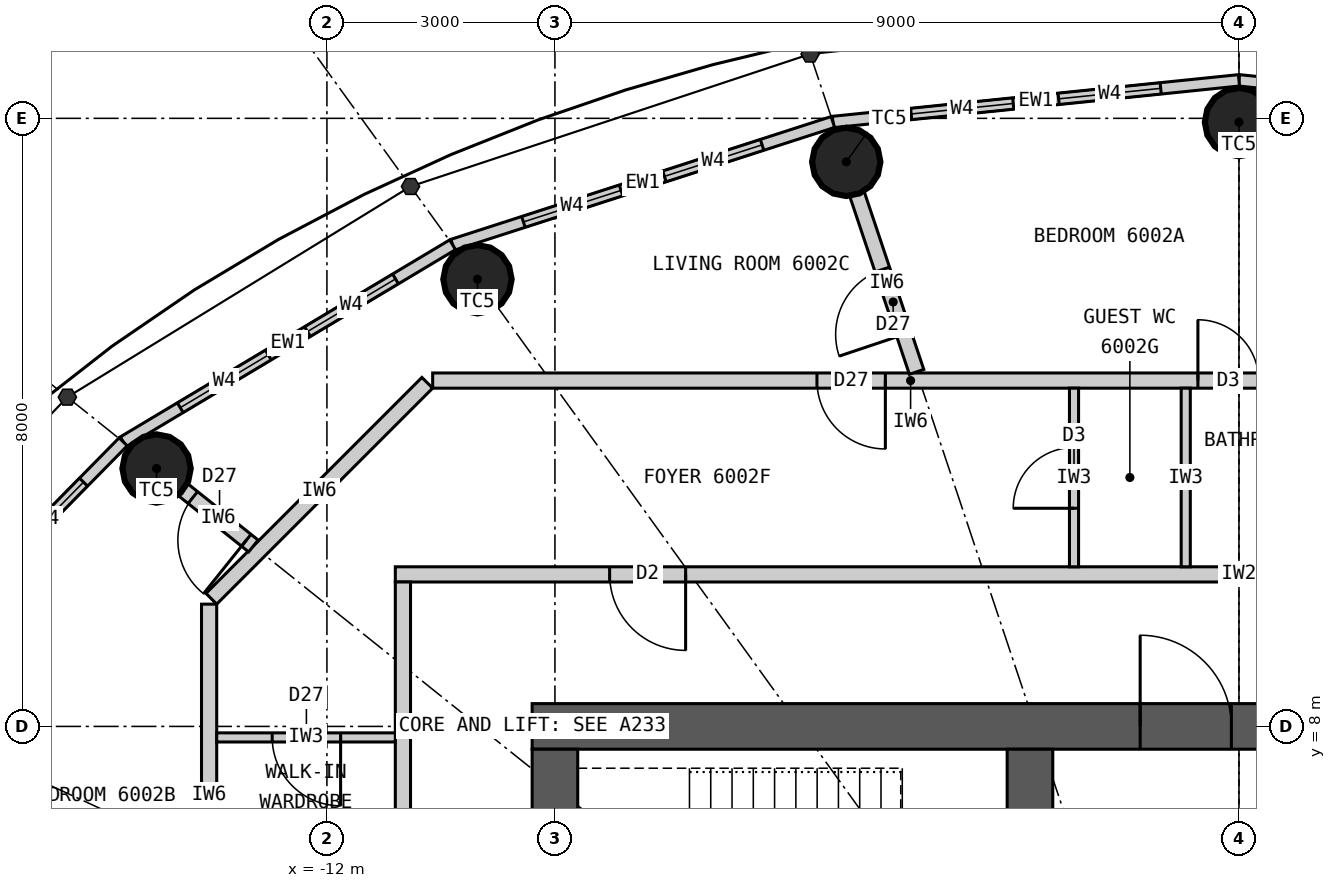
"""IFC4 building model, lengths in metres.
Left out: names, types, materials, properties, quantities, classifications, styles, units other than length and angle.
Written with IfcOpenShell. Run it as: python <this file> out.ifc"""

import sys

from ifc_helpers import new_model, si_unit, direction, frame, frame_2d, origin, origin_2d, place, context, subcontext, project, spatial, rectangle, circle, extrude, element, fill, save


model = new_model("IFC4")
c1 = context("Model", 3, precision=1e-05, world=origin(), true_north=direction((0.0, 1.0)))
c2 = subcontext(c1, "Body", "Model", "MODEL_VIEW")
j1 = project(units=[si_unit("LENGTHUNIT", "METRE"), si_unit("PLANEANGLEUNIT", "RADIAN")], contexts=[c1])
p1 = place(None, origin())
s1 = spatial("IfcSite", under=j1, at=p1, CompositionType="ELEMENT")
p2 = place(p1, origin())
s2 = spatial("IfcBuilding", under=s1, at=p2, CompositionType="ELEMENT")
p3 = place(p2, frame((0.0, 0.0, 222.6)))
s3 = spatial("IfcBuildingStorey", under=s2, at=p3, CompositionType="ELEMENT", Elevation=222.6)
for number, where, z_axis, x_axis in (
    (1, (0.0, 15.95, 0.0), (0.0, 0.0, 1.0), (1.0, 0.0, 0.0)),
    (2, (-5.167, 15.427, 0.0), (0.0, 0.0, 1.0), (1.0, 0.0, 0.0)),
    (3, (-10.019, 13.883, 0.0), (0.0, 0.0, 1.0), (1.0, 0.0, 0.0)),
    (4, (-14.241, 11.393, 0.0), (0.0, 0.0, 1.0), (1.0, 0.0, 0.0)),
):
    element("IfcColumn", number, at=place(p3, frame(where, z_axis=z_axis, x_axis=x_axis)), inside=s3, PredefinedType="COLUMN", context=c2, shape_type="SweptSolid", body=[
        extrude(circle(Radius=0.45, at=origin_2d()), origin(), (0.0, 0.0, 1.0), 3.3),
    ])
p4 = place(p3, frame((-9.3, 8.0, 0.0), z_axis=(0.0, 0.0, 1.0), x_axis=(1.0, 0.0, 0.0)))
e5 = element("IfcWall", 5, at=p4, inside=s3, PredefinedType="SHEAR", context=c2, shape_type="SweptSolid", body=[
    extrude(rectangle(XDim=18.6, YDim=0.6, at=frame_2d((9.3, 0.0))), origin(), (0.0, 0.0, 1.0), 3.3),
])
p5 = place(p4, frame((8.0, 0.0, 0.0)))
e6 = element("IfcOpeningElement", 6, at=p5, cuts=e5, PredefinedType="OPENING", context=c2, shape_type="SweptSolid", body=[
    extrude(rectangle(XDim=1.2, YDim=2.2, at=frame_2d((0.6, 1.1))), frame((0.0, 0.31, 0.0), z_axis=(0.0, -1.0, 0.0), x_axis=(1.0, 0.0, 0.0)), (0.0, 0.0, 1.0), 0.62),
])
p6 = place(p4, frame((15.6, 0.0, 0.0)))
e7 = element("IfcOpeningElement", 7, at=p6, cuts=e5, PredefinedType="OPENING", context=c2, shape_type="SweptSolid", body=[
    extrude(rectangle(XDim=0.9, YDim=2.2, at=frame_2d((0.45, 1.1))), frame((0.0, 0.31, 0.0), z_axis=(0.0, -1.0, 0.0), x_axis=(1.0, 0.0, 0.0)), (0.0, 0.0, 1.0), 0.62),
])
p7 = place(p3, frame((-9.0, 7.7, 0.0), z_axis=(0.0, 0.0, 1.0), x_axis=(0.0, -1.0, 0.0)))
e8 = element("IfcWall", 8, at=p7, inside=s3, PredefinedType="SHEAR", context=c2, shape_type="SweptSolid", body=[
    extrude(rectangle(XDim=15.4, YDim=0.6, at=frame_2d((7.7, 0.0))), origin(), (0.0, 0.0, 1.0), 3.3),
])
p8 = place(p7, frame((6.8, 0.0, 0.0)))
e9 = element("IfcOpeningElement", 9, at=p8, cuts=e8, PredefinedType="OPENING", context=c2, shape_type="SweptSolid", body=[
    extrude(rectangle(XDim=1.8, YDim=2.2, at=frame_2d((0.9, 1.1))), frame((0.0, 0.31, 0.0), z_axis=(0.0, -1.0, 0.0), x_axis=(1.0, 0.0, 0.0)), (0.0, 0.0, 1.0), 0.62),
])
p9 = place(p3, frame((-2.75, 4.5, 0.0), z_axis=(0.0, 0.0, 1.0), x_axis=(0.0, 1.0, 0.0)))
e10 = element("IfcWall", 10, at=p9, inside=s3, PredefinedType="SHEAR", context=c2, shape_type="SweptSolid", body=[
    extrude(rectangle(XDim=3.2, YDim=0.6, at=frame_2d((1.6, 0.0))), origin(), (0.0, 0.0, 1.0), 3.3),
])
p10 = place(p9, frame((0.925, 0.0, 0.0)))
e11 = element("IfcOpeningElement", 11, at=p10, cuts=e10, PredefinedType="OPENING", context=c2, shape_type="SweptSolid", body=[
    extrude(rectangle(XDim=1.1, YDim=2.2, at=frame_2d((0.55, 1.1))), frame((0.0, 0.31, 0.0), z_axis=(0.0, -1.0, 0.0), x_axis=(1.0, 0.0, 0.0)), (0.0, 0.0, 1.0), 0.62),
])
p11 = place(p3, frame((5.343, 15.952, 0.0), z_axis=(0.0, 0.0, 1.0), x_axis=(-0.994774574972, 0.102095763818, 0.0)))
e12 = element("IfcWall", 12, at=p11, inside=s3, PredefinedType="ELEMENTEDWALL", context=c2, shape_type="SweptSolid", body=[
    extrude(rectangle(XDim=5.371, YDim=0.15, at=frame_2d((2.686, 0.0))), origin(), (0.0, 0.0, 1.0), 3.12),
])
p12 = place(p11, frame((1.035, 0.0, 0.9)))
e13 = element("IfcOpeningElement", 13, at=p12, cuts=e12, PredefinedType="OPENING", context=c2, shape_type="SweptSolid", body=[
    extrude(rectangle(XDim=1.35, YDim=1.9, at=frame_2d((0.675, 0.95))), frame((0.0, 0.085, 0.0), z_axis=(0.0, -1.0, 0.0), x_axis=(1.0, 0.0, 0.0)), (0.0, 0.0, 1.0), 0.17),
])
p13 = place(p11, frame((2.985, 0.0, 0.9)))
e14 = element("IfcOpeningElement", 14, at=p13, cuts=e12, PredefinedType="OPENING", context=c2, shape_type="SweptSolid", body=[
    extrude(rectangle(XDim=1.35, YDim=1.9, at=frame_2d((0.675, 0.95))), frame((0.0, 0.085, 0.0), z_axis=(0.0, -1.0, 0.0), x_axis=(1.0, 0.0, 0.0)), (0.0, 0.0, 1.0), 0.17),
])
p14 = place(p3, frame((0.0, 16.5, 0.0), z_axis=(0.0, 0.0, 1.0), x_axis=(-0.994774574972, -0.102095763818, 0.0)))
e15 = element("IfcWall", 15, at=p14, inside=s3, PredefinedType="ELEMENTEDWALL", context=c2, shape_type="SweptSolid", body=[
    extrude(rectangle(XDim=5.371, YDim=0.15, at=frame_2d((2.686, 0.0))), origin(), (0.0, 0.0, 1.0), 3.12),
])
p15 = place(p14, frame((1.035, 0.0, 0.9)))
e16 = element("IfcOpeningElement", 16, at=p15, cuts=e15, PredefinedType="OPENING", context=c2, shape_type="SweptSolid", body=[
    extrude(rectangle(XDim=1.35, YDim=1.9, at=frame_2d((0.675, 0.95))), frame((0.0, 0.085, 0.0), z_axis=(0.0, -1.0, 0.0), x_axis=(1.0, 0.0, 0.0)), (0.0, 0.0, 1.0), 0.17),
])
p16 = place(p14, frame((2.985, 0.0, 0.9)))
e17 = element("IfcOpeningElement", 17, at=p16, cuts=e15, PredefinedType="OPENING", context=c2, shape_type="SweptSolid", body=[
    extrude(rectangle(XDim=1.35, YDim=1.9, at=frame_2d((0.675, 0.95))), frame((0.0, 0.085, 0.0), z_axis=(0.0, -1.0, 0.0), x_axis=(1.0, 0.0, 0.0)), (0.0, 0.0, 1.0), 0.17),
])
p17 = place(p3, frame((-5.343, 15.952, 0.0), z_axis=(0.0, 0.0, 1.0), x_axis=(-0.951644702515, -0.307200846638, 0.0)))
e18 = element("IfcWall", 18, at=p17, inside=s3, PredefinedType="ELEMENTEDWALL", context=c2, shape_type="SweptSolid", body=[
    extrude(rectangle(XDim=5.258, YDim=0.15, at=frame_2d((2.629, 0.0))), origin(), (0.0, 0.0, 1.0), 3.12),
])
p18 = place(p17, frame((0.979, 0.0, 0.9)))
e19 = element("IfcOpeningElement", 19, at=p18, cuts=e18, PredefinedType="OPENING", context=c2, shape_type="SweptSolid", body=[
    extrude(rectangle(XDim=1.35, YDim=1.9, at=frame_2d((0.675, 0.95))), frame((0.0, 0.085, 0.0), z_axis=(0.0, -1.0, 0.0), x_axis=(1.0, 0.0, 0.0)), (0.0, 0.0, 1.0), 0.17),
])
p19 = place(p17, frame((2.929, 0.0, 0.9)))
e20 = element("IfcOpeningElement", 20, at=p19, cuts=e18, PredefinedType="OPENING", context=c2, shape_type="SweptSolid", body=[
    extrude(rectangle(XDim=1.35, YDim=1.9, at=frame_2d((0.675, 0.95))), frame((0.0, 0.085, 0.0), z_axis=(0.0, -1.0, 0.0), x_axis=(1.0, 0.0, 0.0)), (0.0, 0.0, 1.0), 0.17),
])
p20 = place(p3, frame((-10.346, 14.336, 0.0), z_axis=(0.0, 0.0, 1.0), x_axis=(-0.85822150553, -0.513279502265, 0.0)))
e21 = element("IfcWall", 21, at=p20, inside=s3, PredefinedType="ELEMENTEDWALL", context=c2, shape_type="SweptSolid", body=[
    extrude(rectangle(XDim=5.05, YDim=0.15, at=frame_2d((2.525, 0.0))), origin(), (0.0, 0.0, 1.0), 3.12),
])
p21 = place(p20, frame((0.875, 0.0, 0.9)))
e22 = element("IfcOpeningElement", 22, at=p21, cuts=e21, PredefinedType="OPENING", context=c2, shape_type="SweptSolid", body=[
    extrude(rectangle(XDim=1.35, YDim=1.9, at=frame_2d((0.675, 0.95))), frame((0.0, 0.085, 0.0), z_axis=(0.0, -1.0, 0.0), x_axis=(1.0, 0.0, 0.0)), (0.0, 0.0, 1.0), 0.17),
])
p22 = place(p20, frame((2.825, 0.0, 0.9)))
e23 = element("IfcOpeningElement", 23, at=p22, cuts=e21, PredefinedType="OPENING", context=c2, shape_type="SweptSolid", body=[
    extrude(rectangle(XDim=1.35, YDim=1.9, at=frame_2d((0.675, 0.95))), frame((0.0, 0.085, 0.0), z_axis=(0.0, -1.0, 0.0), x_axis=(1.0, 0.0, 0.0)), (0.0, 0.0, 1.0), 0.17),
])
p23 = place(p3, frame((-14.68, 11.744, 0.0), z_axis=(0.0, 0.0, 1.0), x_axis=(-0.701527379618, -0.712642501993, 0.0)))
e24 = element("IfcWall", 24, at=p23, inside=s3, PredefinedType="ELEMENTEDWALL", context=c2, shape_type="SweptSolid", body=[
    extrude(rectangle(XDim=4.788, YDim=0.15, at=frame_2d((2.394, 0.0))), origin(), (0.0, 0.0, 1.0), 3.12),
])
p24 = place(p23, frame((0.744, 0.0, 0.9)))
e25 = element("IfcOpeningElement", 25, at=p24, cuts=e24, PredefinedType="OPENING", context=c2, shape_type="SweptSolid", body=[
    extrude(rectangle(XDim=1.35, YDim=1.9, at=frame_2d((0.675, 0.95))), frame((0.0, 0.085, 0.0), z_axis=(0.0, -1.0, 0.0), x_axis=(1.0, 0.0, 0.0)), (0.0, 0.0, 1.0), 0.17),
])
p25 = place(p23, frame((2.694, 0.0, 0.9)))
e26 = element("IfcOpeningElement", 26, at=p25, cuts=e24, PredefinedType="OPENING", context=c2, shape_type="SweptSolid", body=[
    extrude(rectangle(XDim=1.35, YDim=1.9, at=frame_2d((0.675, 0.95))), frame((0.0, 0.085, 0.0), z_axis=(0.0, -1.0, 0.0), x_axis=(1.0, 0.0, 0.0)), (0.0, 0.0, 1.0), 0.17),
])
p26 = place(p3, frame((-11.1, 10.0, 0.0), z_axis=(0.0, 0.0, 1.0), x_axis=(1.0, 0.0, 0.0)))
e27 = element("IfcWall", 27, at=p26, inside=s3, PredefinedType="PARTITIONING", context=c2, shape_type="SweptSolid", body=[
    extrude(rectangle(XDim=22.2, YDim=0.2, at=frame_2d((11.1, 0.0))), origin(), (0.0, 0.0, 1.0), 3.12),
])
p27 = place(p26, frame((20.9, 0.0, 0.0)))
e28 = element("IfcOpeningElement", 28, at=p27, cuts=e27, PredefinedType="OPENING", context=c2, shape_type="SweptSolid", body=[
    extrude(rectangle(XDim=1.0, YDim=2.2, at=frame_2d((0.5, 1.1))), frame((0.0, 0.11, 0.0), z_axis=(0.0, -1.0, 0.0), x_axis=(1.0, 0.0, 0.0)), (0.0, 0.0, 1.0), 0.22),
])
p28 = place(p26, frame((2.82, 0.0, 0.0)))
e29 = element("IfcOpeningElement", 29, at=p28, cuts=e27, PredefinedType="OPENING", context=c2, shape_type="SweptSolid", body=[
    extrude(rectangle(XDim=1.0, YDim=2.2, at=frame_2d((0.5, 1.1))), frame((0.0, 0.11, 0.0), z_axis=(0.0, -1.0, 0.0), x_axis=(1.0, 0.0, 0.0)), (0.0, 0.0, 1.0), 0.22),
])
p29 = place(p3, frame((-11.0, 9.9, 0.0), z_axis=(0.0, 0.0, 1.0), x_axis=(0.0, -1.0, 0.0)))
e30 = element("IfcWall", 30, at=p29, inside=s3, PredefinedType="PARTITIONING", context=c2, shape_type="SweptSolid", body=[
    extrude(rectangle(XDim=10.114, YDim=0.2, at=frame_2d((5.057, 0.0))), origin(), (0.0, 0.0, 1.0), 3.12),
])
p30 = place(p3, frame((1.968, 12.55, 0.0), z_axis=(0.0, 0.0, 1.0), x_axis=(-1.0, 0.0, 0.0)))
e31 = element("IfcWall", 31, at=p30, inside=s3, PredefinedType="PARTITIONING", context=c2, shape_type="SweptSolid", body=[
    extrude(rectangle(XDim=12.576, YDim=0.2, at=frame_2d((6.288, 0.0))), origin(), (0.0, 0.0, 1.0), 3.12),
])
p31 = place(p30, frame((1.708, 0.0, 0.0)))
e32 = element("IfcOpeningElement", 32, at=p31, cuts=e31, PredefinedType="OPENING", context=c2, shape_type="SweptSolid", body=[
    extrude(rectangle(XDim=0.8, YDim=2.1, at=frame_2d((0.4, 1.05))), frame((0.0, 0.11, 0.0), z_axis=(0.0, -1.0, 0.0), x_axis=(1.0, 0.0, 0.0)), (0.0, 0.0, 1.0), 0.22),
])
p32 = place(p30, frame((6.62, 0.0, 0.0)))
e33 = element("IfcOpeningElement", 33, at=p32, cuts=e31, PredefinedType="OPENING", context=c2, shape_type="SweptSolid", body=[
    extrude(rectangle(XDim=0.9, YDim=2.1, at=frame_2d((0.45, 1.05))), frame((0.0, 0.11, 0.0), z_axis=(0.0, -1.0, 0.0), x_axis=(1.0, 0.0, 0.0)), (0.0, 0.0, 1.0), 0.22),
])
p33 = place(p3, frame((-10.679, 12.521, 0.0), z_axis=(0.0, 0.0, 1.0), x_axis=(-0.707106781187, -0.707106781187, 0.0)))
e34 = element("IfcWall", 34, at=p33, inside=s3, PredefinedType="PARTITIONING", context=c2, shape_type="SweptSolid", body=[
    extrude(rectangle(XDim=4.019, YDim=0.2, at=frame_2d((2.009, 0.0))), origin(), (0.0, 0.0, 1.0), 3.12),
])
p34 = place(p3, frame((-13.55, 9.609, 0.0), z_axis=(0.0, 0.0, 1.0), x_axis=(0.0, -1.0, 0.0)))
e35 = element("IfcWall", 35, at=p34, inside=s3, PredefinedType="PARTITIONING", context=c2, shape_type="SweptSolid", body=[
    extrude(rectangle(XDim=5.009, YDim=0.2, at=frame_2d((2.504, 0.0))), origin(), (0.0, 0.0, 1.0), 3.12),
])
p35 = place(p34, frame((3.633, 0.0, 0.0)))
e36 = element("IfcOpeningElement", 36, at=p35, cuts=e35, PredefinedType="OPENING", context=c2, shape_type="SweptSolid", body=[
    extrude(rectangle(XDim=0.8, YDim=2.1, at=frame_2d((0.4, 1.05))), frame((0.0, 0.11, 0.0), z_axis=(0.0, -1.0, 0.0), x_axis=(1.0, 0.0, 0.0)), (0.0, 0.0, 1.0), 0.22),
])
p36 = place(p3, frame((-4.242, 12.664, 0.0), z_axis=(0.0, 0.0, 1.0), x_axis=(-0.317594928911, 0.948226481981, 0.0)))
e37 = element("IfcWall", 37, at=p36, inside=s3, PredefinedType="PARTITIONING", context=c2, shape_type="SweptSolid", body=[
    extrude(rectangle(XDim=2.464, YDim=0.2, at=frame_2d((1.232, 0.0))), origin(), (0.0, 0.0, 1.0), 2.42),
])
p37 = place(p36, frame((0.52, 0.0, 0.0)))
e38 = element("IfcOpeningElement", 38, at=p37, cuts=e37, PredefinedType="OPENING", context=c2, shape_type="SweptSolid", body=[
    extrude(rectangle(XDim=0.9, YDim=2.1, at=frame_2d((0.45, 1.05))), frame((0.0, 0.11, 0.0), z_axis=(0.0, -1.0, 0.0), x_axis=(1.0, 0.0, 0.0)), (0.0, 0.0, 1.0), 0.22),
])
p38 = place(p3, frame((-12.968, 10.374, 0.0), z_axis=(0.0, 0.0, 1.0), x_axis=(-0.780888968944, 0.624669847345, 0.0)))
e39 = element("IfcWall", 39, at=p38, inside=s3, PredefinedType="PARTITIONING", context=c2, shape_type="SweptSolid", body=[
    extrude(rectangle(XDim=1.181, YDim=0.2, at=frame_2d((0.591, 0.0))), origin(), (0.0, 0.0, 1.0), 2.42),
])
p39 = place(p38, frame((0.12, 0.0, 0.0)))
e40 = element("IfcOpeningElement", 40, at=p39, cuts=e39, PredefinedType="OPENING", context=c2, shape_type="SweptSolid", body=[
    extrude(rectangle(XDim=0.9, YDim=2.1, at=frame_2d((0.45, 1.05))), frame((0.0, 0.11, 0.0), z_axis=(0.0, -1.0, 0.0), x_axis=(1.0, 0.0, 0.0)), (0.0, 0.0, 1.0), 0.22),
])
p40 = place(p3, frame((-0.7, 10.1, 0.0), z_axis=(0.0, 0.0, 1.0), x_axis=(0.0, 1.0, 0.0)))
e41 = element("IfcWall", 41, at=p40, inside=s3, PredefinedType="PARTITIONING", context=c2, shape_type="SweptSolid", body=[
    extrude(rectangle(XDim=2.35, YDim=0.12, at=frame_2d((1.175, 0.0))), origin(), (0.0, 0.0, 1.0), 3.12),
])
p41 = place(p3, frame((-2.17, 10.1, 0.0), z_axis=(0.0, 0.0, 1.0), x_axis=(0.0, 1.0, 0.0)))
e42 = element("IfcWall", 42, at=p41, inside=s3, PredefinedType="PARTITIONING", context=c2, shape_type="SweptSolid", body=[
    extrude(rectangle(XDim=2.35, YDim=0.12, at=frame_2d((1.175, 0.0))), origin(), (0.0, 0.0, 1.0), 3.12),
])
p42 = place(p41, frame((0.77, 0.0, 0.0)))
e43 = element("IfcOpeningElement", 43, at=p42, cuts=e42, PredefinedType="OPENING", context=c2, shape_type="SweptSolid", body=[
    extrude(rectangle(XDim=0.8, YDim=2.1, at=frame_2d((0.4, 1.05))), frame((0.0, 0.07, 0.0), z_axis=(0.0, -1.0, 0.0), x_axis=(1.0, 0.0, 0.0)), (0.0, 0.0, 1.0), 0.14),
])
p43 = place(p3, frame((-11.1, 7.855, 0.0), z_axis=(0.0, 0.0, 1.0), x_axis=(-1.0, 0.0, 0.0)))
e44 = element("IfcWall", 44, at=p43, inside=s3, PredefinedType="PARTITIONING", context=c2, shape_type="SweptSolid", body=[
    extrude(rectangle(XDim=2.35, YDim=0.12, at=frame_2d((1.175, 0.0))), origin(), (0.0, 0.0, 1.0), 3.12),
])
p44 = place(p43, frame((0.72, 0.0, 0.0)))
e45 = element("IfcOpeningElement", 45, at=p44, cuts=e44, PredefinedType="OPENING", context=c2, shape_type="SweptSolid", body=[
    extrude(rectangle(XDim=0.9, YDim=2.1, at=frame_2d((0.45, 1.05))), frame((0.0, 0.07, 0.0), z_axis=(0.0, -1.0, 0.0), x_axis=(1.0, 0.0, 0.0)), (0.0, 0.0, 1.0), 0.14),
])
p45 = place(p15, origin())
e46 = element("IfcWindow", 46, at=p45, inside=s3, PartitioningType="SINGLE_PANEL", PredefinedType="WINDOW", context=c2, shape_type="SweptSolid", body=[
    extrude(rectangle(XDim=1.35, YDim=1.9, at=frame_2d((0.675, 0.95))), frame((0.0, 0.03, 0.0), z_axis=(0.0, -1.0, 0.0), x_axis=(1.0, 0.0, 0.0)), (0.0, 0.0, 1.0), 0.06),
])
fill(e16, e46)
p46 = place(p16, origin())
e47 = element("IfcWindow", 47, at=p46, inside=s3, PartitioningType="SINGLE_PANEL", PredefinedType="WINDOW", context=c2, shape_type="SweptSolid", body=[
    extrude(rectangle(XDim=1.35, YDim=1.9, at=frame_2d((0.675, 0.95))), frame((0.0, 0.03, 0.0), z_axis=(0.0, -1.0, 0.0), x_axis=(1.0, 0.0, 0.0)), (0.0, 0.0, 1.0), 0.06),
])
fill(e17, e47)
p47 = place(p18, origin())
e48 = element("IfcWindow", 48, at=p47, inside=s3, PartitioningType="SINGLE_PANEL", PredefinedType="WINDOW", context=c2, shape_type="SweptSolid", body=[
    extrude(rectangle(XDim=1.35, YDim=1.9, at=frame_2d((0.675, 0.95))), frame((0.0, 0.03, 0.0), z_axis=(0.0, -1.0, 0.0), x_axis=(1.0, 0.0, 0.0)), (0.0, 0.0, 1.0), 0.06),
])
fill(e19, e48)
p48 = place(p19, origin())
e49 = element("IfcWindow", 49, at=p48, inside=s3, PartitioningType="SINGLE_PANEL", PredefinedType="WINDOW", context=c2, shape_type="SweptSolid", body=[
    extrude(rectangle(XDim=1.35, YDim=1.9, at=frame_2d((0.675, 0.95))), frame((0.0, 0.03, 0.0), z_axis=(0.0, -1.0, 0.0), x_axis=(1.0, 0.0, 0.0)), (0.0, 0.0, 1.0), 0.06),
])
fill(e20, e49)
p49 = place(p21, origin())
e50 = element("IfcWindow", 50, at=p49, inside=s3, PartitioningType="SINGLE_PANEL", PredefinedType="WINDOW", context=c2, shape_type="SweptSolid", body=[
    extrude(rectangle(XDim=1.35, YDim=1.9, at=frame_2d((0.675, 0.95))), frame((0.0, 0.03, 0.0), z_axis=(0.0, -1.0, 0.0), x_axis=(1.0, 0.0, 0.0)), (0.0, 0.0, 1.0), 0.06),
])
fill(e22, e50)
p50 = place(p22, origin())
e51 = element("IfcWindow", 51, at=p50, inside=s3, PartitioningType="SINGLE_PANEL", PredefinedType="WINDOW", context=c2, shape_type="SweptSolid", body=[
    extrude(rectangle(XDim=1.35, YDim=1.9, at=frame_2d((0.675, 0.95))), frame((0.0, 0.03, 0.0), z_axis=(0.0, -1.0, 0.0), x_axis=(1.0, 0.0, 0.0)), (0.0, 0.0, 1.0), 0.06),
])
fill(e23, e51)
p51 = place(p24, origin())
e52 = element("IfcWindow", 52, at=p51, inside=s3, PartitioningType="SINGLE_PANEL", PredefinedType="WINDOW", context=c2, shape_type="SweptSolid", body=[
    extrude(rectangle(XDim=1.35, YDim=1.9, at=frame_2d((0.675, 0.95))), frame((0.0, 0.03, 0.0), z_axis=(0.0, -1.0, 0.0), x_axis=(1.0, 0.0, 0.0)), (0.0, 0.0, 1.0), 0.06),
])
fill(e25, e52)
p52 = place(p28, origin())
e53 = element("IfcDoor", 53, at=p52, inside=s3, OperationType="SINGLE_SWING_RIGHT", PredefinedType="DOOR", context=c2, shape_type="SweptSolid", body=[
    extrude(rectangle(XDim=1.0, YDim=2.2, at=frame_2d((0.5, 1.1))), frame((0.0, 0.025, 0.0), z_axis=(0.0, -1.0, 0.0), x_axis=(1.0, 0.0, 0.0)), (0.0, 0.0, 1.0), 0.05),
])
fill(e29, e53)
p53 = place(p31, origin())
e54 = element("IfcDoor", 54, at=p53, inside=s3, OperationType="SINGLE_SWING_RIGHT", PredefinedType="DOOR", context=c2, shape_type="SweptSolid", body=[
    extrude(rectangle(XDim=0.8, YDim=2.1, at=frame_2d((0.4, 1.05))), frame((0.0, 0.025, 0.0), z_axis=(0.0, -1.0, 0.0), x_axis=(1.0, 0.0, 0.0)), (0.0, 0.0, 1.0), 0.05),
])
fill(e32, e54)
p54 = place(p42, origin())
e55 = element("IfcDoor", 55, at=p54, inside=s3, OperationType="SINGLE_SWING_LEFT", PredefinedType="DOOR", context=c2, shape_type="SweptSolid", body=[
    extrude(rectangle(XDim=0.8, YDim=2.1, at=frame_2d((0.4, 1.05))), frame((0.0, 0.025, 0.0), z_axis=(0.0, -1.0, 0.0), x_axis=(1.0, 0.0, 0.0)), (0.0, 0.0, 1.0), 0.05),
])
fill(e43, e55)
p55 = place(p44, origin())
e56 = element("IfcDoor", 56, at=p55, inside=s3, OperationType="SINGLE_SWING_LEFT", PredefinedType="DOOR", context=c2, shape_type="SweptSolid", body=[
    extrude(rectangle(XDim=0.9, YDim=2.1, at=frame_2d((0.45, 1.05))), frame((0.0, 0.025, 0.0), z_axis=(0.0, -1.0, 0.0), x_axis=(1.0, 0.0, 0.0)), (0.0, 0.0, 1.0), 0.05),
])
fill(e45, e56)
p56 = place(p32, origin())
e57 = element("IfcDoor", 57, at=p56, inside=s3, OperationType="SINGLE_SWING_LEFT", PredefinedType="DOOR", context=c2, shape_type="SweptSolid", body=[
    extrude(rectangle(XDim=0.9, YDim=2.1, at=frame_2d((0.45, 1.05))), frame((0.0, 0.025, 0.0), z_axis=(0.0, -1.0, 0.0), x_axis=(1.0, 0.0, 0.0)), (0.0, 0.0, 1.0), 0.05),
])
fill(e33, e57)
p57 = place(p37, origin())
e58 = element("IfcDoor", 58, at=p57, inside=s3, OperationType="SINGLE_SWING_LEFT", PredefinedType="DOOR", context=c2, shape_type="SweptSolid", body=[
    extrude(rectangle(XDim=0.9, YDim=2.1, at=frame_2d((0.45, 1.05))), frame((0.0, 0.025, 0.0), z_axis=(0.0, -1.0, 0.0), x_axis=(1.0, 0.0, 0.0)), (0.0, 0.0, 1.0), 0.05),
])
fill(e38, e58)
p58 = place(p39, origin())
e59 = element("IfcDoor", 59, at=p58, inside=s3, OperationType="SINGLE_SWING_LEFT", PredefinedType="DOOR", context=c2, shape_type="SweptSolid", body=[
    extrude(rectangle(XDim=0.9, YDim=2.1, at=frame_2d((0.45, 1.05))), frame((0.0, 0.025, 0.0), z_axis=(0.0, -1.0, 0.0), x_axis=(1.0, 0.0, 0.0)), (0.0, 0.0, 1.0), 0.05),
])
fill(e40, e59)
p59 = place(p5, origin())
e60 = element("IfcDoor", 60, at=p59, inside=s3, OperationType="SINGLE_SWING_LEFT", PredefinedType="DOOR", context=c2, shape_type="SweptSolid", body=[
    extrude(rectangle(XDim=1.2, YDim=2.2, at=frame_2d((0.6, 1.1))), frame((0.0, 0.025, 0.0), z_axis=(0.0, -1.0, 0.0), x_axis=(1.0, 0.0, 0.0)), (0.0, 0.0, 1.0), 0.05),
])
fill(e6, e60)
save(model, sys.argv[1])
